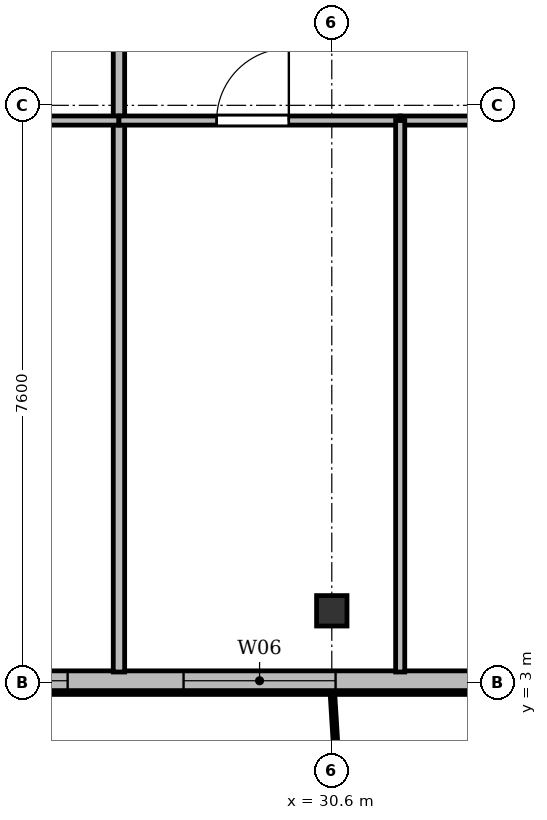
"""IFC4 building model, lengths in metres.
Left out: names, types, materials, properties, quantities, classifications, styles, units other than length and angle.
Written with IfcOpenShell. Run it as: python <this file> out.ifc"""

import sys

from ifc_helpers import new_model, si_unit, direction, frame, frame_2d, origin, origin_2d, place, context, subcontext, project, spatial, rectangle, i_section, extrude, source, transform, mapped, element, fill, save


model = new_model("IFC4")
c1 = context("Model", 3, precision=1e-05, world=origin(), true_north=direction((0.0, 1.0)))
c2 = subcontext(c1, "Body", "Model", "MODEL_VIEW")
j1 = project(units=[si_unit("LENGTHUNIT", "METRE"), si_unit("PLANEANGLEUNIT", "RADIAN")], contexts=[c1])
p1 = place(None, origin())
s1 = spatial("IfcSite", under=j1, at=p1, CompositionType="ELEMENT")
p2 = place(p1, origin())
s2 = spatial("IfcBuilding", under=s1, at=p2, CompositionType="ELEMENT")
p3 = place(p2, frame((0.0, 0.0, 117.7)))
s3 = spatial("IfcBuildingStorey", under=s2, at=p3, CompositionType="ELEMENT", Elevation=117.7)
m1 = source(origin(), c2, "Body", "SweptSolid", [
    extrude(i_section(OverallWidth=0.4, OverallDepth=0.4, WebThickness=0.022, FlangeThickness=0.035, at=origin_2d()), origin(), (0.0, 0.0, 1.0), 3.6),
])
p4 = place(p3, frame((30.6, 3.95, 0.0), z_axis=(0.0, 0.0, 1.0), x_axis=(1.0, 0.0, 0.0)))
e1 = element("IfcColumn", 1, at=p4, inside=s3, PredefinedType="COLUMN", context=c2, shape_type="MappedRepresentation", body=[
    mapped(m1, transform((0.0, 0.0, 0.0), x_axis=(1.0, 0.0, 0.0), y_axis=(0.0, 1.0, 0.0), z_axis=(0.0, 0.0, 1.0), scale=1.0)),
])
p5 = place(p3, frame((66.9, 3.03, 0.0), z_axis=(0.0, 0.0, 1.0), x_axis=(-1.0, 0.0, 0.0)))
e2 = element("IfcWall", 2, at=p5, inside=s3, PredefinedType="SOLIDWALL", context=c2, shape_type="SweptSolid", body=[
    extrude(rectangle(XDim=59.4, YDim=0.26, at=frame_2d((29.7, 0.0))), origin(), (0.0, 0.0, 1.0), 3.34),
])
p6 = place(p5, frame((0.395, 0.0, 0.9)))
e3 = element("IfcOpeningElement", 3, at=p6, cuts=e2, PredefinedType="OPENING", context=c2, shape_type="SweptSolid", body=[
    extrude(rectangle(XDim=1.8, YDim=1.8, at=frame_2d((0.9, 0.9))), frame((0.0, 0.14, 0.0), z_axis=(0.0, -1.0, 0.0), x_axis=(1.0, 0.0, 0.0)), (0.0, 0.0, 1.0), 0.28),
])
p7 = place(p5, frame((4.2, 0.0, 0.9)))
e4 = element("IfcOpeningElement", 4, at=p7, cuts=e2, PredefinedType="OPENING", context=c2, shape_type="SweptSolid", body=[
    extrude(rectangle(XDim=2.2, YDim=1.8, at=frame_2d((1.1, 0.9))), frame((0.0, 0.14, 0.0), z_axis=(0.0, -1.0, 0.0), x_axis=(1.0, 0.0, 0.0)), (0.0, 0.0, 1.0), 0.28),
])
p8 = place(p5, frame((11.25, 0.0, 0.9)))
e5 = element("IfcOpeningElement", 5, at=p8, cuts=e2, PredefinedType="OPENING", context=c2, shape_type="SweptSolid", body=[
    extrude(rectangle(XDim=1.5, YDim=1.75, at=frame_2d((0.75, 0.875))), frame((0.0, 0.14, 0.0), z_axis=(0.0, -1.0, 0.0), x_axis=(1.0, 0.0, 0.0)), (0.0, 0.0, 1.0), 0.28),
])
p9 = place(p5, frame((16.92, 0.0, 0.0)))
e6 = element("IfcOpeningElement", 6, at=p9, cuts=e2, PredefinedType="OPENING", context=c2, shape_type="SweptSolid", body=[
    extrude(rectangle(XDim=1.2, YDim=2.2, at=frame_2d((0.6, 1.1))), frame((0.0, 0.14, 0.0), z_axis=(0.0, -1.0, 0.0), x_axis=(1.0, 0.0, 0.0)), (0.0, 0.0, 1.0), 0.28),
])
p10 = place(p5, frame((18.675, 0.0, 0.9)))
e7 = element("IfcOpeningElement", 7, at=p10, cuts=e2, PredefinedType="OPENING", context=c2, shape_type="SweptSolid", body=[
    extrude(rectangle(XDim=1.65, YDim=1.85, at=frame_2d((0.825, 0.925))), frame((0.0, 0.14, 0.0), z_axis=(0.0, -1.0, 0.0), x_axis=(1.0, 0.0, 0.0)), (0.0, 0.0, 1.0), 0.28),
])
p11 = place(p5, frame((21.0, 0.0, 0.9)))
e8 = element("IfcOpeningElement", 8, at=p11, cuts=e2, PredefinedType="OPENING", context=c2, shape_type="SweptSolid", body=[
    extrude(rectangle(XDim=1.8, YDim=1.8, at=frame_2d((0.9, 0.9))), frame((0.0, 0.14, 0.0), z_axis=(0.0, -1.0, 0.0), x_axis=(1.0, 0.0, 0.0)), (0.0, 0.0, 1.0), 0.28),
])
p12 = place(p5, frame((26.3, 0.0, 0.9)))
e9 = element("IfcOpeningElement", 9, at=p12, cuts=e2, PredefinedType="OPENING", context=c2, shape_type="SweptSolid", body=[
    extrude(rectangle(XDim=2.2, YDim=1.8, at=frame_2d((1.1, 0.9))), frame((0.0, 0.14, 0.0), z_axis=(0.0, -1.0, 0.0), x_axis=(1.0, 0.0, 0.0)), (0.0, 0.0, 1.0), 0.28),
])
p13 = place(p5, frame((32.8, 0.0, 0.9)))
e10 = element("IfcOpeningElement", 10, at=p13, cuts=e2, PredefinedType="OPENING", context=c2, shape_type="SweptSolid", body=[
    extrude(rectangle(XDim=1.5, YDim=1.75, at=frame_2d((0.75, 0.875))), frame((0.0, 0.14, 0.0), z_axis=(0.0, -1.0, 0.0), x_axis=(1.0, 0.0, 0.0)), (0.0, 0.0, 1.0), 0.28),
])
p14 = place(p5, frame((36.25, 0.0, 0.9)))
e11 = element("IfcOpeningElement", 11, at=p14, cuts=e2, PredefinedType="OPENING", context=c2, shape_type="SweptSolid", body=[
    extrude(rectangle(XDim=2.0, YDim=1.95, at=frame_2d((1.0, 0.975))), frame((0.0, 0.14, 0.0), z_axis=(0.0, -1.0, 0.0), x_axis=(1.0, 0.0, 0.0)), (0.0, 0.0, 1.0), 0.28),
])
p15 = place(p5, frame((39.775, 0.0, 0.9)))
e12 = element("IfcOpeningElement", 12, at=p15, cuts=e2, PredefinedType="OPENING", context=c2, shape_type="SweptSolid", body=[
    extrude(rectangle(XDim=1.65, YDim=1.85, at=frame_2d((0.825, 0.925))), frame((0.0, 0.14, 0.0), z_axis=(0.0, -1.0, 0.0), x_axis=(1.0, 0.0, 0.0)), (0.0, 0.0, 1.0), 0.28),
])
p16 = place(p5, frame((42.7, 0.0, 0.9)))
e13 = element("IfcOpeningElement", 13, at=p16, cuts=e2, PredefinedType="OPENING", context=c2, shape_type="SweptSolid", body=[
    extrude(rectangle(XDim=1.8, YDim=1.8, at=frame_2d((0.9, 0.9))), frame((0.0, 0.14, 0.0), z_axis=(0.0, -1.0, 0.0), x_axis=(1.0, 0.0, 0.0)), (0.0, 0.0, 1.0), 0.28),
])
p17 = place(p5, frame((46.435, 0.0, 0.0)))
e14 = element("IfcOpeningElement", 14, at=p17, cuts=e2, PredefinedType="OPENING", context=c2, shape_type="SweptSolid", body=[
    extrude(rectangle(XDim=1.2, YDim=2.2, at=frame_2d((0.6, 1.1))), frame((0.0, 0.14, 0.0), z_axis=(0.0, -1.0, 0.0), x_axis=(1.0, 0.0, 0.0)), (0.0, 0.0, 1.0), 0.28),
])
p18 = place(p5, frame((49.0, 0.0, 0.9)))
e15 = element("IfcOpeningElement", 15, at=p18, cuts=e2, PredefinedType="OPENING", context=c2, shape_type="SweptSolid", body=[
    extrude(rectangle(XDim=1.5, YDim=1.75, at=frame_2d((0.75, 0.875))), frame((0.0, 0.14, 0.0), z_axis=(0.0, -1.0, 0.0), x_axis=(1.0, 0.0, 0.0)), (0.0, 0.0, 1.0), 0.28),
])
p19 = place(p5, frame((53.0, 0.0, 0.9)))
e16 = element("IfcOpeningElement", 16, at=p19, cuts=e2, PredefinedType="OPENING", context=c2, shape_type="SweptSolid", body=[
    extrude(rectangle(XDim=2.0, YDim=1.95, at=frame_2d((1.0, 0.975))), frame((0.0, 0.14, 0.0), z_axis=(0.0, -1.0, 0.0), x_axis=(1.0, 0.0, 0.0)), (0.0, 0.0, 1.0), 0.28),
])
p20 = place(p5, frame((57.18, 0.0, 0.9)))
e17 = element("IfcOpeningElement", 17, at=p20, cuts=e2, PredefinedType="OPENING", context=c2, shape_type="SweptSolid", body=[
    extrude(rectangle(XDim=1.65, YDim=1.85, at=frame_2d((0.825, 0.925))), frame((0.0, 0.14, 0.0), z_axis=(0.0, -1.0, 0.0), x_axis=(1.0, 0.0, 0.0)), (0.0, 0.0, 1.0), 0.28),
])
p21 = place(p3, frame((27.8, 3.145, 0.0), z_axis=(0.0, 0.0, 1.0), x_axis=(0.0, 1.0, 0.0)))
e18 = element("IfcWall", 18, at=p21, inside=s3, PredefinedType="PARTITIONING", context=c2, shape_type="SweptSolid", body=[
    extrude(rectangle(XDim=24.455, YDim=0.15, at=frame_2d((12.228, 0.0))), origin(), (0.0, 0.0, 1.0), 2.752),
])
p22 = place(p3, frame((24.8, 10.4, 0.0), z_axis=(0.0, 0.0, 1.0), x_axis=(1.0, 0.0, 0.0)))
e19 = element("IfcWall", 19, at=p22, inside=s3, PredefinedType="PARTITIONING", context=c2, shape_type="SweptSolid", body=[
    extrude(rectangle(XDim=3.0, YDim=0.12, at=frame_2d((1.5, 0.0))), origin(), (0.0, 0.0, 1.0), 3.34),
])
p23 = place(p22, frame((1.025, 0.0, 0.0)))
e20 = element("IfcOpeningElement", 20, at=p23, cuts=e19, PredefinedType="OPENING", context=c2, shape_type="SweptSolid", body=[
    extrude(rectangle(XDim=0.95, YDim=2.15, at=frame_2d((0.475, 1.075))), frame((0.0, 0.07, 0.0), z_axis=(0.0, -1.0, 0.0), x_axis=(1.0, 0.0, 0.0)), (0.0, 0.0, 1.0), 0.14),
])
p24 = place(p3, frame((27.8, 10.4, 0.0), z_axis=(0.0, 0.0, 1.0), x_axis=(1.0, 0.0, 0.0)))
e21 = element("IfcWall", 21, at=p24, inside=s3, PredefinedType="PARTITIONING", context=c2, shape_type="SweptSolid", body=[
    extrude(rectangle(XDim=3.7, YDim=0.12, at=frame_2d((1.85, 0.0))), origin(), (0.0, 0.0, 1.0), 2.84),
])
p25 = place(p24, frame((1.285, 0.0, 0.0)))
e22 = element("IfcOpeningElement", 22, at=p25, cuts=e21, PredefinedType="OPENING", context=c2, shape_type="SweptSolid", body=[
    extrude(rectangle(XDim=0.95, YDim=2.15, at=frame_2d((0.475, 1.075))), frame((0.0, 0.07, 0.0), z_axis=(0.0, -1.0, 0.0), x_axis=(1.0, 0.0, 0.0)), (0.0, 0.0, 1.0), 0.14),
])
p26 = place(p3, frame((31.5, 10.4, 0.0), z_axis=(0.0, 0.0, 1.0), x_axis=(1.0, 0.0, 0.0)))
e23 = element("IfcWall", 23, at=p26, inside=s3, PredefinedType="PARTITIONING", context=c2, shape_type="SweptSolid", body=[
    extrude(rectangle(XDim=3.7, YDim=0.12, at=frame_2d((1.85, 0.0))), origin(), (0.0, 0.0, 1.0), 3.34),
])
p27 = place(p26, frame((1.285, 0.0, 0.0)))
e24 = element("IfcOpeningElement", 24, at=p27, cuts=e23, PredefinedType="OPENING", context=c2, shape_type="SweptSolid", body=[
    extrude(rectangle(XDim=0.95, YDim=2.15, at=frame_2d((0.475, 1.075))), frame((0.0, 0.07, 0.0), z_axis=(0.0, -1.0, 0.0), x_axis=(1.0, 0.0, 0.0)), (0.0, 0.0, 1.0), 0.14),
])
p28 = place(p3, frame((31.5, 3.145, 0.0), z_axis=(0.0, 0.0, 1.0), x_axis=(0.0, 1.0, 0.0)))
e25 = element("IfcWall", 25, at=p28, inside=s3, PredefinedType="PARTITIONING", context=c2, shape_type="SweptSolid", body=[
    extrude(rectangle(XDim=7.255, YDim=0.12, at=frame_2d((3.627, 0.0))), origin(), (0.0, 0.0, 1.0), 2.752),
])
m2 = source(origin(), c2, "Body", "SweptSolid", [
    extrude(rectangle(XDim=2.0, YDim=1.95, at=frame_2d((1.0, 0.975))), frame((0.0, 0.03, 0.0), z_axis=(0.0, -1.0, 0.0), x_axis=(1.0, 0.0, 0.0)), (0.0, 0.0, 1.0), 0.06),
])
p29 = place(p14, origin())
e26 = element("IfcWindow", 26, at=p29, inside=s3, PartitioningType="SINGLE_PANEL", PredefinedType="WINDOW", context=c2, shape_type="MappedRepresentation", body=[
    mapped(m2, transform((0.0, 0.0, 0.0), x_axis=(1.0, 0.0, 0.0), y_axis=(0.0, 1.0, 0.0), z_axis=(0.0, 0.0, 1.0), scale=1.0)),
])
fill(e11, e26)
m3 = source(origin(), c2, "Body", "SweptSolid", [
    extrude(rectangle(XDim=1.65, YDim=1.85, at=frame_2d((0.825, 0.925))), frame((0.0, 0.03, 0.0), z_axis=(0.0, -1.0, 0.0), x_axis=(1.0, 0.0, 0.0)), (0.0, 0.0, 1.0), 0.06),
])
p30 = place(p15, origin())
e27 = element("IfcWindow", 27, at=p30, inside=s3, PartitioningType="SINGLE_PANEL", PredefinedType="WINDOW", context=c2, shape_type="MappedRepresentation", body=[
    mapped(m3, transform((0.0, 0.0, 0.0), x_axis=(1.0, 0.0, 0.0), y_axis=(0.0, 1.0, 0.0), z_axis=(0.0, 0.0, 1.0), scale=1.0)),
])
fill(e12, e27)
m4 = source(origin(), c2, "Body", "SweptSolid", [
    extrude(rectangle(XDim=0.95, YDim=2.15, at=frame_2d((0.475, 1.075))), frame((0.0, 0.025, 0.0), z_axis=(0.0, -1.0, 0.0), x_axis=(1.0, 0.0, 0.0)), (0.0, 0.0, 1.0), 0.05),
])
p31 = place(p25, origin())
e28 = element("IfcDoor", 28, at=p31, inside=s3, OperationType="SINGLE_SWING_RIGHT", PredefinedType="DOOR", context=c2, shape_type="MappedRepresentation", body=[
    mapped(m4, transform((0.0, 0.0, 0.0), x_axis=(1.0, 0.0, 0.0), y_axis=(0.0, 1.0, 0.0), z_axis=(0.0, 0.0, 1.0), scale=1.0)),
])
fill(e22, e28)
save(model, sys.argv[1])
